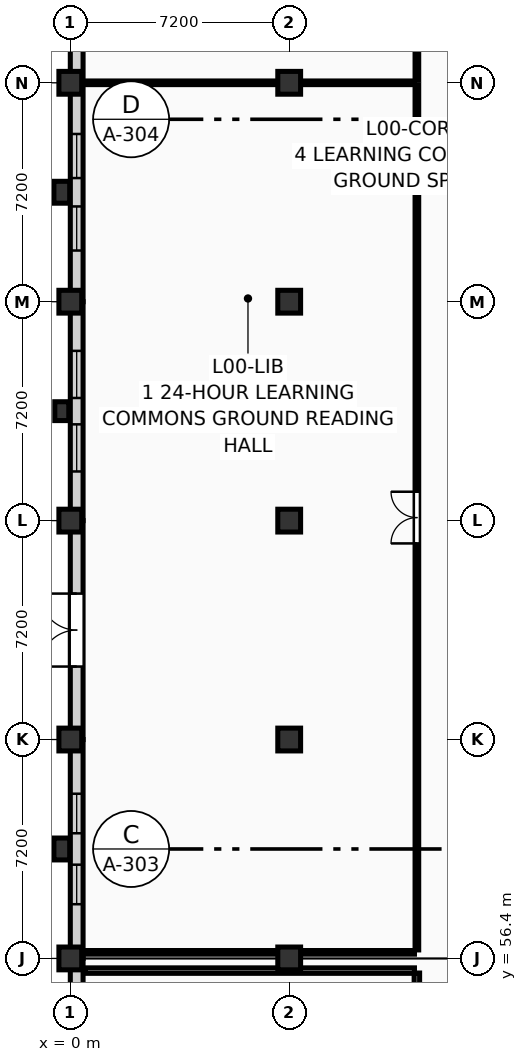
"""IFC4 building model, lengths in metres.
Left out: names, types, materials, properties, quantities, classifications, styles, units other than length and angle.
Written with IfcOpenShell. Run it as: python <this file> out.ifc"""

import sys

from ifc_helpers import new_model, si_unit, direction, frame, frame_2d, origin, origin_2d, place, context, subcontext, project, spatial, rectangle, extrude, element, fill, save


model = new_model("IFC4")
c1 = context("Model", 3, precision=1e-05, world=origin(), true_north=direction((0.0, 1.0)))
c2 = subcontext(c1, "Body", "Model", "MODEL_VIEW")
j1 = project(units=[si_unit("LENGTHUNIT", "METRE"), si_unit("PLANEANGLEUNIT", "RADIAN")], contexts=[c1])
p1 = place(None, origin())
s1 = spatial("IfcSite", under=j1, at=p1, CompositionType="ELEMENT")
p2 = place(p1, origin())
s2 = spatial("IfcBuilding", under=s1, at=p2, CompositionType="ELEMENT")
p3 = place(p2, origin())
s3 = spatial("IfcBuildingStorey", under=s2, at=p3, CompositionType="ELEMENT", Elevation=0.0)
for number, where, z_axis, x_axis in (
    (1, (0.0, 56.4, 0.0), (0.0, 0.0, 1.0), (1.0, 0.0, 0.0)),
    (2, (0.0, 63.6, 0.0), (0.0, 0.0, 1.0), (1.0, 0.0, 0.0)),
    (3, (0.0, 70.8, 0.0), (0.0, 0.0, 1.0), (1.0, 0.0, 0.0)),
    (4, (0.0, 78.0, 0.0), (0.0, 0.0, 1.0), (1.0, 0.0, 0.0)),
    (5, (0.0, 85.2, 0.0), (0.0, 0.0, 1.0), (1.0, 0.0, 0.0)),
    (6, (7.2, 56.4, 0.0), (0.0, 0.0, 1.0), (1.0, 0.0, 0.0)),
    (7, (7.2, 63.6, 0.0), (0.0, 0.0, 1.0), (1.0, 0.0, 0.0)),
    (8, (7.2, 70.8, 0.0), (0.0, 0.0, 1.0), (1.0, 0.0, 0.0)),
    (9, (7.2, 78.0, 0.0), (0.0, 0.0, 1.0), (1.0, 0.0, 0.0)),
    (10, (7.2, 85.2, 0.0), (0.0, 0.0, 1.0), (1.0, 0.0, 0.0)),
):
    element("IfcColumn", number, at=place(p3, frame(where, z_axis=z_axis, x_axis=x_axis)), inside=s3, PredefinedType="COLUMN", context=c2, shape_type="SweptSolid", body=[
        extrude(rectangle(XDim=0.75, YDim=0.75, at=origin_2d()), origin(), (0.0, 0.0, 1.0), 4.5),
    ])
p4 = place(p3, frame((-0.28, 60.0, 0.0), z_axis=(0.0, 0.0, 1.0), x_axis=(1.0, 0.0, 0.0)))
e11 = element("IfcColumn", 11, at=p4, inside=s3, PredefinedType="PILASTER", context=c2, shape_type="SweptSolid", body=[
    extrude(rectangle(XDim=0.52, YDim=0.72, at=origin_2d()), origin(), (0.0, 0.0, 1.0), 4.5),
])
p5 = place(p3, frame((-0.28, 74.4, 0.0), z_axis=(0.0, 0.0, 1.0), x_axis=(1.0, 0.0, 0.0)))
e12 = element("IfcColumn", 12, at=p5, inside=s3, PredefinedType="PILASTER", context=c2, shape_type="SweptSolid", body=[
    extrude(rectangle(XDim=0.46, YDim=0.62, at=origin_2d()), origin(), (0.0, 0.0, 1.0), 4.5),
])
p6 = place(p3, frame((-0.28, 81.6, 0.0), z_axis=(0.0, 0.0, 1.0), x_axis=(1.0, 0.0, 0.0)))
e13 = element("IfcColumn", 13, at=p6, inside=s3, PredefinedType="PILASTER", context=c2, shape_type="SweptSolid", body=[
    extrude(rectangle(XDim=0.52, YDim=0.72, at=origin_2d()), origin(), (0.0, 0.0, 1.0), 4.5),
])
p7 = place(p3, frame((0.21, 49.2, 0.0), z_axis=(0.0, 0.0, 1.0), x_axis=(0.0, 1.0, 0.0)))
e14 = element("IfcWall", 14, at=p7, inside=s3, PredefinedType="SOLIDWALL", context=c2, shape_type="SweptSolid", body=[
    extrude(rectangle(XDim=7.2, YDim=0.42, at=frame_2d((3.6, 0.0))), origin(), (0.0, 0.0, 1.0), 3.62),
])
p8 = place(p7, frame((1.717, 0.0, 0.45)))
e15 = element("IfcOpeningElement", 15, at=p8, cuts=e14, PredefinedType="OPENING", context=c2, shape_type="SweptSolid", body=[
    extrude(rectangle(XDim=1.4, YDim=2.55, at=frame_2d((0.7, 1.275))), frame((0.0, 0.222, 0.0), z_axis=(0.0, -1.0, 0.0), x_axis=(1.0, 0.0, 0.0)), (0.0, 0.0, 1.0), 0.444),
])
p9 = place(p7, frame((4.083, 0.0, 0.45)))
e16 = element("IfcOpeningElement", 16, at=p9, cuts=e14, PredefinedType="OPENING", context=c2, shape_type="SweptSolid", body=[
    extrude(rectangle(XDim=1.4, YDim=2.55, at=frame_2d((0.7, 1.275))), frame((0.0, 0.222, 0.0), z_axis=(0.0, -1.0, 0.0), x_axis=(1.0, 0.0, 0.0)), (0.0, 0.0, 1.0), 0.444),
])
p10 = place(p3, frame((0.21, 56.4, 0.0), z_axis=(0.0, 0.0, 1.0), x_axis=(0.0, 1.0, 0.0)))
e17 = element("IfcWall", 17, at=p10, inside=s3, PredefinedType="SOLIDWALL", context=c2, shape_type="SweptSolid", body=[
    extrude(rectangle(XDim=7.2, YDim=0.42, at=frame_2d((3.6, 0.0))), origin(), (0.0, 0.0, 1.0), 3.62),
])
p11 = place(p10, frame((1.783, 0.0, 0.45)))
e18 = element("IfcOpeningElement", 18, at=p11, cuts=e17, PredefinedType="OPENING", context=c2, shape_type="SweptSolid", body=[
    extrude(rectangle(XDim=1.3, YDim=2.5, at=frame_2d((0.65, 1.25))), frame((0.0, 0.222, 0.0), z_axis=(0.0, -1.0, 0.0), x_axis=(1.0, 0.0, 0.0)), (0.0, 0.0, 1.0), 0.444),
])
p12 = place(p10, frame((4.117, 0.0, 0.45)))
e19 = element("IfcOpeningElement", 19, at=p12, cuts=e17, PredefinedType="OPENING", context=c2, shape_type="SweptSolid", body=[
    extrude(rectangle(XDim=1.3, YDim=2.5, at=frame_2d((0.65, 1.25))), frame((0.0, 0.222, 0.0), z_axis=(0.0, -1.0, 0.0), x_axis=(1.0, 0.0, 0.0)), (0.0, 0.0, 1.0), 0.444),
])
p13 = place(p3, frame((0.21, 63.6, 0.0), z_axis=(0.0, 0.0, 1.0), x_axis=(0.0, 1.0, 0.0)))
e20 = element("IfcWall", 20, at=p13, inside=s3, PredefinedType="SOLIDWALL", context=c2, shape_type="SweptSolid", body=[
    extrude(rectangle(XDim=7.2, YDim=0.42, at=frame_2d((3.6, 0.0))), origin(), (0.0, 0.0, 1.0), 3.62),
])
p14 = place(p13, frame((2.4, 0.0, 0.0)))
e21 = element("IfcOpeningElement", 21, at=p14, cuts=e20, PredefinedType="OPENING", context=c2, shape_type="SweptSolid", body=[
    extrude(rectangle(XDim=2.4, YDim=2.6, at=frame_2d((1.2, 1.3))), frame((0.0, 0.222, 0.0), z_axis=(0.0, -1.0, 0.0), x_axis=(1.0, 0.0, 0.0)), (0.0, 0.0, 1.0), 0.444),
])
p15 = place(p3, frame((0.21, 70.8, 0.0), z_axis=(0.0, 0.0, 1.0), x_axis=(0.0, 1.0, 0.0)))
e22 = element("IfcWall", 22, at=p15, inside=s3, PredefinedType="SOLIDWALL", context=c2, shape_type="SweptSolid", body=[
    extrude(rectangle(XDim=7.2, YDim=0.42, at=frame_2d((3.6, 0.0))), origin(), (0.0, 0.0, 1.0), 3.62),
])
p16 = place(p15, frame((1.617, 0.0, 0.45)))
e23 = element("IfcOpeningElement", 23, at=p16, cuts=e22, PredefinedType="OPENING", context=c2, shape_type="SweptSolid", body=[
    extrude(rectangle(XDim=1.55, YDim=2.55, at=frame_2d((0.775, 1.275))), frame((0.0, 0.222, 0.0), z_axis=(0.0, -1.0, 0.0), x_axis=(1.0, 0.0, 0.0)), (0.0, 0.0, 1.0), 0.444),
])
p17 = place(p15, frame((4.033, 0.0, 0.45)))
e24 = element("IfcOpeningElement", 24, at=p17, cuts=e22, PredefinedType="OPENING", context=c2, shape_type="SweptSolid", body=[
    extrude(rectangle(XDim=1.55, YDim=2.55, at=frame_2d((0.775, 1.275))), frame((0.0, 0.222, 0.0), z_axis=(0.0, -1.0, 0.0), x_axis=(1.0, 0.0, 0.0)), (0.0, 0.0, 1.0), 0.444),
])
p18 = place(p3, frame((0.21, 78.0, 0.0), z_axis=(0.0, 0.0, 1.0), x_axis=(0.0, 1.0, 0.0)))
e25 = element("IfcWall", 25, at=p18, inside=s3, PredefinedType="SOLIDWALL", context=c2, shape_type="SweptSolid", body=[
    extrude(rectangle(XDim=7.2, YDim=0.42, at=frame_2d((3.6, 0.0))), origin(), (0.0, 0.0, 1.0), 3.62),
])
p19 = place(p18, frame((1.683, 0.0, 0.45)))
e26 = element("IfcOpeningElement", 26, at=p19, cuts=e25, PredefinedType="OPENING", context=c2, shape_type="SweptSolid", body=[
    extrude(rectangle(XDim=1.45, YDim=2.5, at=frame_2d((0.725, 1.25))), frame((0.0, 0.222, 0.0), z_axis=(0.0, -1.0, 0.0), x_axis=(1.0, 0.0, 0.0)), (0.0, 0.0, 1.0), 0.444),
])
p20 = place(p18, frame((4.067, 0.0, 0.45)))
e27 = element("IfcOpeningElement", 27, at=p20, cuts=e25, PredefinedType="OPENING", context=c2, shape_type="SweptSolid", body=[
    extrude(rectangle(XDim=1.45, YDim=2.5, at=frame_2d((0.725, 1.25))), frame((0.0, 0.222, 0.0), z_axis=(0.0, -1.0, 0.0), x_axis=(1.0, 0.0, 0.0)), (0.0, 0.0, 1.0), 0.444),
])
p21 = place(p3, frame((0.21, 85.2, 0.0), z_axis=(0.0, 0.0, 1.0), x_axis=(0.0, 1.0, 0.0)))
e28 = element("IfcWall", 28, at=p21, inside=s3, PredefinedType="SOLIDWALL", context=c2, shape_type="SweptSolid", body=[
    extrude(rectangle(XDim=7.2, YDim=0.42, at=frame_2d((3.6, 0.0))), origin(), (0.0, 0.0, 1.0), 3.62),
])
p22 = place(p21, frame((1.75, 0.0, 0.45)))
e29 = element("IfcOpeningElement", 29, at=p22, cuts=e28, PredefinedType="OPENING", context=c2, shape_type="SweptSolid", body=[
    extrude(rectangle(XDim=1.35, YDim=2.45, at=frame_2d((0.675, 1.225))), frame((0.0, 0.222, 0.0), z_axis=(0.0, -1.0, 0.0), x_axis=(1.0, 0.0, 0.0)), (0.0, 0.0, 1.0), 0.444),
])
p23 = place(p21, frame((4.1, 0.0, 0.45)))
e30 = element("IfcOpeningElement", 30, at=p23, cuts=e28, PredefinedType="OPENING", context=c2, shape_type="SweptSolid", body=[
    extrude(rectangle(XDim=1.35, YDim=2.45, at=frame_2d((0.675, 1.225))), frame((0.0, 0.222, 0.0), z_axis=(0.0, -1.0, 0.0), x_axis=(1.0, 0.0, 0.0)), (0.0, 0.0, 1.0), 0.444),
])
p24 = place(p3, frame((11.4, 48.08, 0.0), z_axis=(0.0, 0.0, 1.0), x_axis=(0.0, 1.0, 0.0)))
e31 = element("IfcWall", 31, at=p24, inside=s3, PredefinedType="PARTITIONING", context=c2, shape_type="SweptSolid", body=[
    extrude(rectangle(XDim=7.84, YDim=0.18, at=frame_2d((3.92, 0.0))), origin(), (0.0, 0.0, 1.0), 4.235),
])
p25 = place(p24, frame((3.17, 0.0, 0.0)))
e32 = element("IfcOpeningElement", 32, at=p25, cuts=e31, PredefinedType="OPENING", context=c2, shape_type="SweptSolid", body=[
    extrude(rectangle(XDim=1.5, YDim=2.25, at=frame_2d((0.75, 1.125))), frame((0.0, 0.102, 0.0), z_axis=(0.0, -1.0, 0.0), x_axis=(1.0, 0.0, 0.0)), (0.0, 0.0, 1.0), 0.204),
])
p26 = place(p3, frame((0.48, 56.0, 0.0), z_axis=(0.0, 0.0, 1.0), x_axis=(1.0, 0.0, 0.0)))
e33 = element("IfcWall", 33, at=p26, inside=s3, PredefinedType="PARTITIONING", context=c2, shape_type="SweptSolid", body=[
    extrude(rectangle(XDim=10.84, YDim=0.18, at=frame_2d((5.42, 0.0))), origin(), (0.0, 0.0, 1.0), 3.485),
])
p27 = place(p3, frame((0.48, 56.6, 0.0), z_axis=(0.0, 0.0, 1.0), x_axis=(1.0, 0.0, 0.0)))
e34 = element("IfcWall", 34, at=p27, inside=s3, PredefinedType="PARTITIONING", context=c2, shape_type="SweptSolid", body=[
    extrude(rectangle(XDim=10.84, YDim=0.12, at=frame_2d((5.42, 0.0))), origin(), (0.0, 0.0, 1.0), 3.485),
])
p28 = place(p3, frame((11.4, 56.68, 0.0), z_axis=(0.0, 0.0, 1.0), x_axis=(0.0, 1.0, 0.0)))
e35 = element("IfcWall", 35, at=p28, inside=s3, PredefinedType="PARTITIONING", context=c2, shape_type="SweptSolid", body=[
    extrude(rectangle(XDim=28.44, YDim=0.12, at=frame_2d((14.22, 0.0))), origin(), (0.0, 0.0, 1.0), 4.235),
])
p29 = place(p28, frame((13.37, 0.0, 0.0)))
e36 = element("IfcOpeningElement", 36, at=p29, cuts=e35, PredefinedType="OPENING", context=c2, shape_type="SweptSolid", body=[
    extrude(rectangle(XDim=1.7, YDim=2.28, at=frame_2d((0.85, 1.14))), frame((0.0, 0.072, 0.0), z_axis=(0.0, -1.0, 0.0), x_axis=(1.0, 0.0, 0.0)), (0.0, 0.0, 1.0), 0.144),
])
p30 = place(p3, frame((0.48, 85.2, 0.0), z_axis=(0.0, 0.0, 1.0), x_axis=(1.0, 0.0, 0.0)))
e37 = element("IfcWall", 37, at=p30, inside=s3, PredefinedType="PARTITIONING", context=c2, shape_type="SweptSolid", body=[
    extrude(rectangle(XDim=10.84, YDim=0.12, at=frame_2d((5.42, 0.0))), origin(), (0.0, 0.0, 1.0), 3.485),
])
p31 = place(p3, frame((11.4, 85.28, 0.0), z_axis=(0.0, 0.0, 1.0), x_axis=(0.0, 1.0, 0.0)))
e38 = element("IfcWall", 38, at=p31, inside=s3, PredefinedType="PARTITIONING", context=c2, shape_type="SweptSolid", body=[
    extrude(rectangle(XDim=25.84, YDim=0.12, at=frame_2d((12.92, 0.0))), origin(), (0.0, 0.0, 1.0), 4.235),
])
p32 = place(p31, frame((11.94, 0.0, 0.0)))
e39 = element("IfcOpeningElement", 39, at=p32, cuts=e38, PredefinedType="OPENING", context=c2, shape_type="SweptSolid", body=[
    extrude(rectangle(XDim=1.7, YDim=2.28, at=frame_2d((0.85, 1.14))), frame((0.0, 0.072, 0.0), z_axis=(0.0, -1.0, 0.0), x_axis=(1.0, 0.0, 0.0)), (0.0, 0.0, 1.0), 0.144),
])
p33 = place(p11, origin())
e40 = element("IfcWindow", 40, at=p33, inside=s3, PartitioningType="SINGLE_PANEL", PredefinedType="WINDOW", context=c2, shape_type="SweptSolid", body=[
    extrude(rectangle(XDim=1.3, YDim=2.5, at=frame_2d((0.65, 1.25))), frame((0.0, 0.03, 0.0), z_axis=(0.0, -1.0, 0.0), x_axis=(1.0, 0.0, 0.0)), (0.0, 0.0, 1.0), 0.06),
])
fill(e18, e40)
p34 = place(p12, origin())
e41 = element("IfcWindow", 41, at=p34, inside=s3, PartitioningType="SINGLE_PANEL", PredefinedType="WINDOW", context=c2, shape_type="SweptSolid", body=[
    extrude(rectangle(XDim=1.3, YDim=2.5, at=frame_2d((0.65, 1.25))), frame((0.0, 0.03, 0.0), z_axis=(0.0, -1.0, 0.0), x_axis=(1.0, 0.0, 0.0)), (0.0, 0.0, 1.0), 0.06),
])
fill(e19, e41)
p35 = place(p14, origin())
e42 = element("IfcDoor", 42, at=p35, inside=s3, OperationType="DOUBLE_DOOR_SINGLE_SWING", PredefinedType="DOOR", context=c2, shape_type="SweptSolid", body=[
    extrude(rectangle(XDim=2.4, YDim=2.6, at=frame_2d((1.2, 1.3))), frame((0.0, 0.025, 0.0), z_axis=(0.0, -1.0, 0.0), x_axis=(1.0, 0.0, 0.0)), (0.0, 0.0, 1.0), 0.05),
])
fill(e21, e42)
p36 = place(p16, origin())
e43 = element("IfcWindow", 43, at=p36, inside=s3, PartitioningType="SINGLE_PANEL", PredefinedType="WINDOW", context=c2, shape_type="SweptSolid", body=[
    extrude(rectangle(XDim=1.55, YDim=2.55, at=frame_2d((0.775, 1.275))), frame((0.0, 0.03, 0.0), z_axis=(0.0, -1.0, 0.0), x_axis=(1.0, 0.0, 0.0)), (0.0, 0.0, 1.0), 0.06),
])
fill(e23, e43)
p37 = place(p17, origin())
e44 = element("IfcWindow", 44, at=p37, inside=s3, PartitioningType="SINGLE_PANEL", PredefinedType="WINDOW", context=c2, shape_type="SweptSolid", body=[
    extrude(rectangle(XDim=1.55, YDim=2.55, at=frame_2d((0.775, 1.275))), frame((0.0, 0.03, 0.0), z_axis=(0.0, -1.0, 0.0), x_axis=(1.0, 0.0, 0.0)), (0.0, 0.0, 1.0), 0.06),
])
fill(e24, e44)
p38 = place(p19, origin())
e45 = element("IfcWindow", 45, at=p38, inside=s3, PartitioningType="SINGLE_PANEL", PredefinedType="WINDOW", context=c2, shape_type="SweptSolid", body=[
    extrude(rectangle(XDim=1.45, YDim=2.5, at=frame_2d((0.725, 1.25))), frame((0.0, 0.03, 0.0), z_axis=(0.0, -1.0, 0.0), x_axis=(1.0, 0.0, 0.0)), (0.0, 0.0, 1.0), 0.06),
])
fill(e26, e45)
p39 = place(p20, origin())
e46 = element("IfcWindow", 46, at=p39, inside=s3, PartitioningType="SINGLE_PANEL", PredefinedType="WINDOW", context=c2, shape_type="SweptSolid", body=[
    extrude(rectangle(XDim=1.45, YDim=2.5, at=frame_2d((0.725, 1.25))), frame((0.0, 0.03, 0.0), z_axis=(0.0, -1.0, 0.0), x_axis=(1.0, 0.0, 0.0)), (0.0, 0.0, 1.0), 0.06),
])
fill(e27, e46)
p40 = place(p29, origin())
e47 = element("IfcDoor", 47, at=p40, inside=s3, OperationType="DOUBLE_DOOR_SINGLE_SWING", PredefinedType="DOOR", context=c2, shape_type="SweptSolid", body=[
    extrude(rectangle(XDim=1.7, YDim=2.28, at=frame_2d((0.85, 1.14))), frame((0.0, 0.025, 0.0), z_axis=(0.0, -1.0, 0.0), x_axis=(1.0, 0.0, 0.0)), (0.0, 0.0, 1.0), 0.05),
])
fill(e36, e47)
save(model, sys.argv[1])
